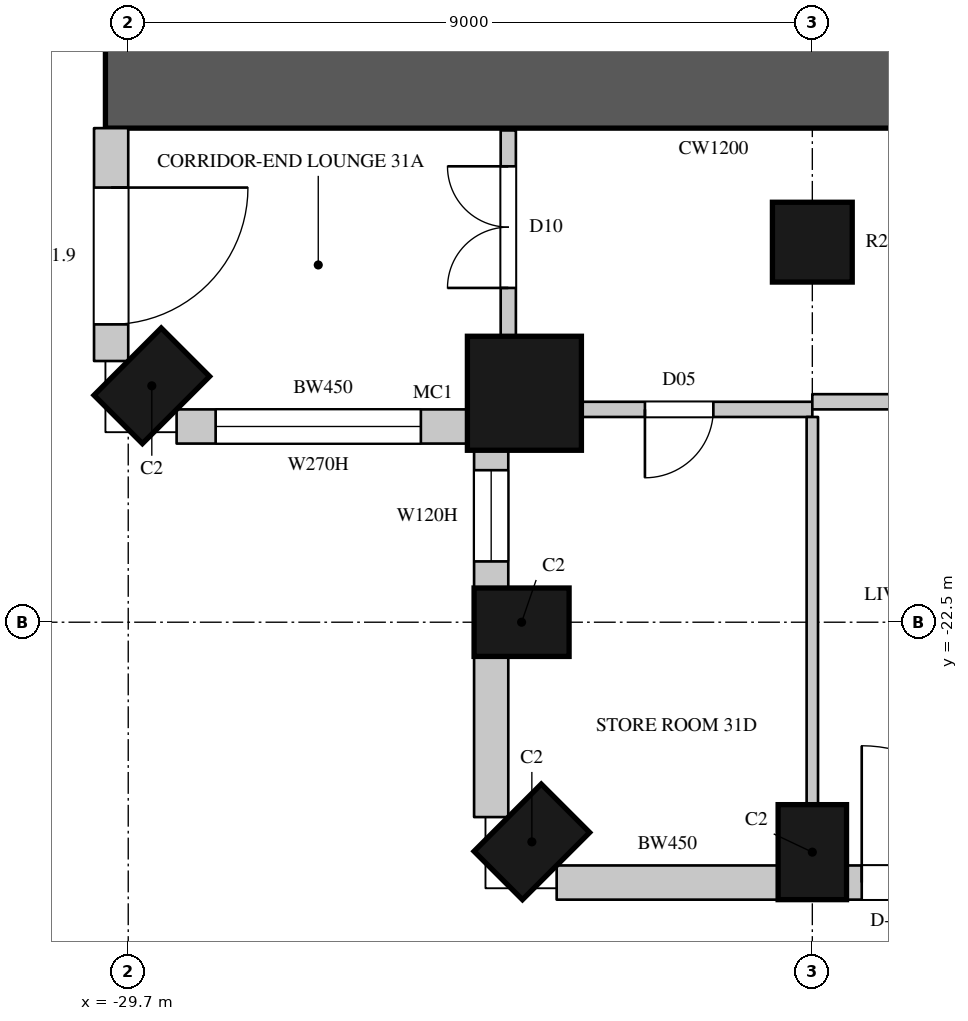
"""IFC4 building model, lengths in metres.
Left out: names, types, materials, properties, quantities, classifications, styles, units other than length and angle.
Written with IfcOpenShell. Run it as: python <this file> out.ifc"""

import sys

from ifc_helpers import new_model, si_unit, direction, frame, frame_2d, origin, origin_2d, place, context, subcontext, project, spatial, rectangle, circle, extrude, element, fill, save


model = new_model("IFC4")
c1 = context("Model", 3, precision=1e-05, world=origin(), true_north=direction((0.0, 1.0)))
c2 = subcontext(c1, "Body", "Model", "MODEL_VIEW")
j1 = project(units=[si_unit("LENGTHUNIT", "METRE"), si_unit("PLANEANGLEUNIT", "RADIAN")], contexts=[c1])
p1 = place(None, origin())
s1 = spatial("IfcSite", under=j1, at=p1, CompositionType="ELEMENT")
p2 = place(p1, origin())
s2 = spatial("IfcBuilding", under=s1, at=p2, CompositionType="ELEMENT")
p3 = place(p2, frame((0.0, 0.0, 141.9)))
s3 = spatial("IfcBuildingStorey", under=s2, at=p3, CompositionType="ELEMENT", Elevation=141.9)
p4 = place(p3, frame((-29.39, -19.39, 0.0), z_axis=(0.0, 0.0, 1.0), x_axis=(0.707106781187, -0.707106781187, 0.0)))
e1 = element("IfcColumn", 1, at=p4, inside=s3, PredefinedType="COLUMN", context=c2, shape_type="SweptSolid", body=[
    extrude(rectangle(XDim=0.9, YDim=1.25, at=origin_2d()), origin(), (0.0, 0.0, 1.0), 3.6),
])
p5 = place(p3, frame((-24.488, -19.488, 0.0), z_axis=(0.0, 0.0, 1.0), x_axis=(1.0, 0.0, 0.0)))
e2 = element("IfcColumn", 2, at=p5, inside=s3, PredefinedType="COLUMN", context=c2, shape_type="SweptSolid", body=[
    extrude(circle(Radius=0.75, at=origin_2d()), origin(), (0.0, 0.0, 1.0), 3.6),
])
for number, where, z_axis, x_axis in (
    (3, (-24.525, -22.5, 0.0), (0.0, 0.0, 1.0), (0.0, -1.0, 0.0)),
    (4, (-24.39, -25.39, 0.0), (0.0, 0.0, 1.0), (0.707, -0.707, 0.0)),
    (5, (-20.7, -25.525, 0.0), (0.0, 0.0, 1.0), (1.0, 0.0, 0.0)),
):
    element("IfcColumn", number, at=place(p3, frame(where, z_axis=z_axis, x_axis=x_axis)), inside=s3, PredefinedType="COLUMN", context=c2, shape_type="SweptSolid", body=[
        extrude(rectangle(XDim=0.9, YDim=1.25, at=origin_2d()), origin(), (0.0, 0.0, 1.0), 3.6),
    ])
p6 = place(p3, frame((-20.7, -17.5, 0.0), z_axis=(0.0, 0.0, 1.0), x_axis=(1.0, 0.0, 0.0)))
e6 = element("IfcColumn", 6, at=p6, inside=s3, PredefinedType="COLUMN", context=c2, shape_type="SweptSolid", body=[
    extrude(circle(Radius=0.525, at=origin_2d()), origin(), (0.0, 0.0, 1.0), 3.6),
])
p7 = place(p3, frame((-29.925, -16.0, 0.0), z_axis=(0.0, 0.0, 1.0), x_axis=(0.0, -1.0, 0.0)))
e7 = element("IfcWall", 7, at=p7, inside=s3, PredefinedType="SOLIDWALL", context=c2, shape_type="SweptSolid", body=[
    extrude(rectangle(XDim=3.064, YDim=0.45, at=frame_2d((1.532, 0.0))), origin(), (0.0, 0.0, 1.0), 3.3),
])
p8 = place(p7, frame((0.782, 0.0, 0.0)))
e8 = element("IfcOpeningElement", 8, at=p8, cuts=e7, PredefinedType="OPENING", context=c2, shape_type="SweptSolid", body=[
    extrude(rectangle(XDim=1.8, YDim=2.4, at=frame_2d((0.9, 1.2))), frame((0.0, 0.235, 0.0), z_axis=(0.0, -1.0, 0.0), x_axis=(1.0, 0.0, 0.0)), (0.0, 0.0, 1.0), 0.47),
])
p9 = place(p3, frame((-29.064, -19.925, 0.0), z_axis=(0.0, 0.0, 1.0), x_axis=(1.0, 0.0, 0.0)))
e9 = element("IfcWall", 9, at=p9, inside=s3, PredefinedType="SOLIDWALL", context=c2, shape_type="SweptSolid", body=[
    extrude(rectangle(XDim=3.857, YDim=0.45, at=frame_2d((1.928, 0.0))), origin(), (0.0, 0.0, 1.0), 3.3),
])
p10 = place(p9, frame((0.514, 0.0, 1.05)))
e10 = element("IfcOpeningElement", 10, at=p10, cuts=e9, PredefinedType="OPENING", context=c2, shape_type="SweptSolid", body=[
    extrude(rectangle(XDim=2.7, YDim=2.0, at=frame_2d((1.35, 1.0))), frame((0.0, 0.235, 0.0), z_axis=(0.0, -1.0, 0.0), x_axis=(1.0, 0.0, 0.0)), (0.0, 0.0, 1.0), 0.47),
])
p11 = place(p3, frame((-24.925, -20.207, 0.0), z_axis=(0.0, 0.0, 1.0), x_axis=(0.0, -1.0, 0.0)))
e11 = element("IfcWall", 11, at=p11, inside=s3, PredefinedType="SOLIDWALL", context=c2, shape_type="SweptSolid", body=[
    extrude(rectangle(XDim=1.843, YDim=0.45, at=frame_2d((0.921, 0.0))), origin(), (0.0, 0.0, 1.0), 3.3),
])
p12 = place(p11, frame((0.293, 0.0, 1.05)))
e12 = element("IfcOpeningElement", 12, at=p12, cuts=e11, PredefinedType="OPENING", context=c2, shape_type="SweptSolid", body=[
    extrude(rectangle(XDim=1.2, YDim=2.0, at=frame_2d((0.6, 1.0))), frame((0.0, 0.235, 0.0), z_axis=(0.0, -1.0, 0.0), x_axis=(1.0, 0.0, 0.0)), (0.0, 0.0, 1.0), 0.47),
])
p13 = place(p3, frame((-24.925, -22.95, 0.0), z_axis=(0.0, 0.0, 1.0), x_axis=(0.0, -1.0, 0.0)))
e13 = element("IfcWall", 13, at=p13, inside=s3, PredefinedType="SOLIDWALL", context=c2, shape_type="SweptSolid", body=[
    extrude(rectangle(XDim=2.114, YDim=0.45, at=frame_2d((1.057, 0.0))), origin(), (0.0, 0.0, 1.0), 3.3),
])
p14 = place(p3, frame((-24.064, -25.925, 0.0), z_axis=(0.0, 0.0, 1.0), x_axis=(1.0, 0.0, 0.0)))
e14 = element("IfcWall", 14, at=p14, inside=s3, PredefinedType="SOLIDWALL", context=c2, shape_type="SweptSolid", body=[
    extrude(rectangle(XDim=2.914, YDim=0.45, at=frame_2d((1.457, 0.0))), origin(), (0.0, 0.0, 1.0), 3.3),
])
p15 = place(p3, frame((-20.25, -25.925, 0.0), z_axis=(0.0, 0.0, 1.0), x_axis=(1.0, 0.0, 0.0)))
e15 = element("IfcWall", 15, at=p15, inside=s3, PredefinedType="SOLIDWALL", context=c2, shape_type="SweptSolid", body=[
    extrude(rectangle(XDim=8.1, YDim=0.45, at=frame_2d((4.05, 0.0))), origin(), (0.0, 0.0, 1.0), 3.3),
])
p16 = place(p15, frame((0.2, 0.0, 0.0)))
e16 = element("IfcOpeningElement", 16, at=p16, cuts=e15, PredefinedType="OPENING", context=c2, shape_type="SweptSolid", body=[
    extrude(rectangle(XDim=1.8, YDim=2.4, at=frame_2d((0.9, 1.2))), frame((0.0, 0.235, 0.0), z_axis=(0.0, -1.0, 0.0), x_axis=(1.0, 0.0, 0.0)), (0.0, 0.0, 1.0), 0.47),
])
p17 = place(p15, frame((2.2, 0.0, 1.05)))
e17 = element("IfcOpeningElement", 17, at=p17, cuts=e15, PredefinedType="OPENING", context=c2, shape_type="SweptSolid", body=[
    extrude(rectangle(XDim=1.2, YDim=2.0, at=frame_2d((0.6, 1.0))), frame((0.0, 0.235, 0.0), z_axis=(0.0, -1.0, 0.0), x_axis=(1.0, 0.0, 0.0)), (0.0, 0.0, 1.0), 0.47),
])
p18 = place(p15, frame((4.249, 0.0, 0.0)))
e18 = element("IfcOpeningElement", 18, at=p18, cuts=e15, PredefinedType="OPENING", context=c2, shape_type="SweptSolid", body=[
    extrude(rectangle(XDim=1.8, YDim=2.4, at=frame_2d((0.9, 1.2))), frame((0.0, 0.235, 0.0), z_axis=(0.0, -1.0, 0.0), x_axis=(1.0, 0.0, 0.0)), (0.0, 0.0, 1.0), 0.47),
])
p19 = place(p15, frame((6.7, 0.0, 1.05)))
e19 = element("IfcOpeningElement", 19, at=p19, cuts=e15, PredefinedType="OPENING", context=c2, shape_type="SweptSolid", body=[
    extrude(rectangle(XDim=1.2, YDim=2.0, at=frame_2d((0.6, 1.0))), frame((0.0, 0.235, 0.0), z_axis=(0.0, -1.0, 0.0), x_axis=(1.0, 0.0, 0.0)), (0.0, 0.0, 1.0), 0.47),
])
p20 = place(p3, frame((-30.0, -15.4, 0.0), z_axis=(0.0, 0.0, 1.0), x_axis=(1.0, 0.0, 0.0)))
e20 = element("IfcWall", 20, at=p20, inside=s3, PredefinedType="SHEAR", context=c2, shape_type="SweptSolid", body=[
    extrude(rectangle(XDim=16.0, YDim=1.2, at=frame_2d((8.0, 0.0))), origin(), (0.0, 0.0, 1.0), 3.6),
])
p21 = place(p20, frame((13.4, 0.0, 0.0)))
e21 = element("IfcOpeningElement", 21, at=p21, cuts=e20, PredefinedType="OPENING", context=c2, shape_type="SweptSolid", body=[
    extrude(rectangle(XDim=1.5, YDim=2.4, at=frame_2d((0.75, 1.2))), frame((0.0, 0.61, 0.0), z_axis=(0.0, -1.0, 0.0), x_axis=(1.0, 0.0, 0.0)), (0.0, 0.0, 1.0), 1.22),
])
p22 = place(p3, frame((-24.7, -18.752, 0.0), z_axis=(0.0, 0.0, 1.0), x_axis=(0.0, 1.0, 0.0)))
e22 = element("IfcWall", 22, at=p22, inside=s3, PredefinedType="PARTITIONING", context=c2, shape_type="SweptSolid", body=[
    extrude(rectangle(XDim=2.722, YDim=0.2, at=frame_2d((1.361, 0.0))), origin(), (0.0, 0.0, 1.0), 3.3),
])
p23 = place(p22, frame((0.65, 0.0, 0.0)))
e23 = element("IfcOpeningElement", 23, at=p23, cuts=e22, PredefinedType="OPENING", context=c2, shape_type="SweptSolid", body=[
    extrude(rectangle(XDim=1.6, YDim=2.4, at=frame_2d((0.8, 1.2))), frame((0.0, 0.11, 0.0), z_axis=(0.0, -1.0, 0.0), x_axis=(1.0, 0.0, 0.0)), (0.0, 0.0, 1.0), 0.22),
])
p24 = place(p3, frame((-23.752, -19.7, 0.0), z_axis=(0.0, 0.0, 1.0), x_axis=(1.0, 0.0, 0.0)))
e24 = element("IfcWall", 24, at=p24, inside=s3, PredefinedType="PARTITIONING", context=c2, shape_type="SweptSolid", body=[
    extrude(rectangle(XDim=3.052, YDim=0.2, at=frame_2d((1.526, 0.0))), origin(), (0.0, 0.0, 1.0), 3.3),
])
p25 = place(p24, frame((0.85, 0.0, 0.0)))
e25 = element("IfcOpeningElement", 25, at=p25, cuts=e24, PredefinedType="OPENING", context=c2, shape_type="SweptSolid", body=[
    extrude(rectangle(XDim=0.9, YDim=2.2, at=frame_2d((0.45, 1.1))), frame((0.0, 0.11, 0.0), z_axis=(0.0, -1.0, 0.0), x_axis=(1.0, 0.0, 0.0)), (0.0, 0.0, 1.0), 0.22),
])
p26 = place(p3, frame((-20.7, -19.6, 0.0), z_axis=(0.0, 0.0, 1.0), x_axis=(1.0, 0.0, 0.0)))
e26 = element("IfcWall", 26, at=p26, inside=s3, PredefinedType="PARTITIONING", context=c2, shape_type="SweptSolid", body=[
    extrude(rectangle(XDim=38.825, YDim=0.2, at=frame_2d((19.413, 0.0))), origin(), (0.0, 0.0, 1.0), 3.3),
])
p27 = place(p26, frame((3.15, 0.0, 0.0)))
e27 = element("IfcOpeningElement", 27, at=p27, cuts=e26, PredefinedType="OPENING", context=c2, shape_type="SweptSolid", body=[
    extrude(rectangle(XDim=1.1, YDim=2.4, at=frame_2d((0.55, 1.2))), frame((0.0, 0.11, 0.0), z_axis=(0.0, -1.0, 0.0), x_axis=(1.0, 0.0, 0.0)), (0.0, 0.0, 1.0), 0.22),
])
p28 = place(p26, frame((14.85, 0.0, 0.0)))
e28 = element("IfcOpeningElement", 28, at=p28, cuts=e26, PredefinedType="OPENING", context=c2, shape_type="SweptSolid", body=[
    extrude(rectangle(XDim=1.1, YDim=2.4, at=frame_2d((0.55, 1.2))), frame((0.0, 0.11, 0.0), z_axis=(0.0, -1.0, 0.0), x_axis=(1.0, 0.0, 0.0)), (0.0, 0.0, 1.0), 0.22),
])
p29 = place(p26, frame((23.85, 0.0, 0.0)))
e29 = element("IfcOpeningElement", 29, at=p29, cuts=e26, PredefinedType="OPENING", context=c2, shape_type="SweptSolid", body=[
    extrude(rectangle(XDim=1.1, YDim=2.4, at=frame_2d((0.55, 1.2))), frame((0.0, 0.11, 0.0), z_axis=(0.0, -1.0, 0.0), x_axis=(1.0, 0.0, 0.0)), (0.0, 0.0, 1.0), 0.22),
])
p30 = place(p26, frame((37.3, 0.0, 0.0)))
e30 = element("IfcOpeningElement", 30, at=p30, cuts=e26, PredefinedType="OPENING", context=c2, shape_type="SweptSolid", body=[
    extrude(rectangle(XDim=0.95, YDim=2.2, at=frame_2d((0.475, 1.1))), frame((0.0, 0.11, 0.0), z_axis=(0.0, -1.0, 0.0), x_axis=(1.0, 0.0, 0.0)), (0.0, 0.0, 1.0), 0.22),
])
p31 = place(p3, frame((-20.7, -24.9, 0.0), z_axis=(0.0, 0.0, 1.0), x_axis=(0.0, 1.0, 0.0)))
e31 = element("IfcWall", 31, at=p31, inside=s3, PredefinedType="PARTITIONING", context=c2, shape_type="SweptSolid", body=[
    extrude(rectangle(XDim=5.1, YDim=0.15, at=frame_2d((2.55, 0.0))), origin(), (0.0, 0.0, 1.0), 2.75),
])
p32 = place(p8, origin())
e32 = element("IfcDoor", 32, at=p32, inside=s3, OperationType="SLIDING_TO_LEFT", PredefinedType="DOOR", context=c2, shape_type="SweptSolid", body=[
    extrude(rectangle(XDim=1.8, YDim=2.4, at=frame_2d((0.9, 1.2))), frame((0.0, 0.13, 0.0), z_axis=(0.0, -1.0, 0.0), x_axis=(1.0, 0.0, 0.0)), (0.0, 0.0, 1.0), 0.05),
])
fill(e8, e32)
p33 = place(p10, origin())
e33 = element("IfcWindow", 33, at=p33, inside=s3, PartitioningType="SINGLE_PANEL", PredefinedType="WINDOW", context=c2, shape_type="SweptSolid", body=[
    extrude(rectangle(XDim=2.7, YDim=2.0, at=frame_2d((1.35, 1.0))), frame((0.0, 0.135, 0.0), z_axis=(0.0, -1.0, 0.0), x_axis=(1.0, 0.0, 0.0)), (0.0, 0.0, 1.0), 0.06),
])
fill(e10, e33)
p34 = place(p12, origin())
e34 = element("IfcWindow", 34, at=p34, inside=s3, PartitioningType="SINGLE_PANEL", PredefinedType="WINDOW", context=c2, shape_type="SweptSolid", body=[
    extrude(rectangle(XDim=1.2, YDim=2.0, at=frame_2d((0.6, 1.0))), frame((0.0, 0.135, 0.0), z_axis=(0.0, -1.0, 0.0), x_axis=(1.0, 0.0, 0.0)), (0.0, 0.0, 1.0), 0.06),
])
fill(e12, e34)
p35 = place(p16, origin())
e35 = element("IfcDoor", 35, at=p35, inside=s3, OperationType="SLIDING_TO_LEFT", PredefinedType="DOOR", context=c2, shape_type="SweptSolid", body=[
    extrude(rectangle(XDim=1.8, YDim=2.4, at=frame_2d((0.9, 1.2))), frame((0.0, 0.13, 0.0), z_axis=(0.0, -1.0, 0.0), x_axis=(1.0, 0.0, 0.0)), (0.0, 0.0, 1.0), 0.05),
])
fill(e16, e35)
p36 = place(p25, origin())
e36 = element("IfcDoor", 36, at=p36, inside=s3, OperationType="SINGLE_SWING_RIGHT", PredefinedType="DOOR", context=c2, shape_type="SweptSolid", body=[
    extrude(rectangle(XDim=0.9, YDim=2.2, at=frame_2d((0.45, 1.1))), frame((0.0, 0.025, 0.0), z_axis=(0.0, -1.0, 0.0), x_axis=(1.0, 0.0, 0.0)), (0.0, 0.0, 1.0), 0.05),
])
fill(e25, e36)
p37 = place(p23, origin())
e37 = element("IfcDoor", 37, at=p37, inside=s3, OperationType="DOUBLE_DOOR_SINGLE_SWING", PredefinedType="DOOR", context=c2, shape_type="SweptSolid", body=[
    extrude(rectangle(XDim=1.6, YDim=2.4, at=frame_2d((0.8, 1.2))), frame((0.0, 0.025, 0.0), z_axis=(0.0, -1.0, 0.0), x_axis=(1.0, 0.0, 0.0)), (0.0, 0.0, 1.0), 0.05),
])
fill(e23, e37)
save(model, sys.argv[1])
